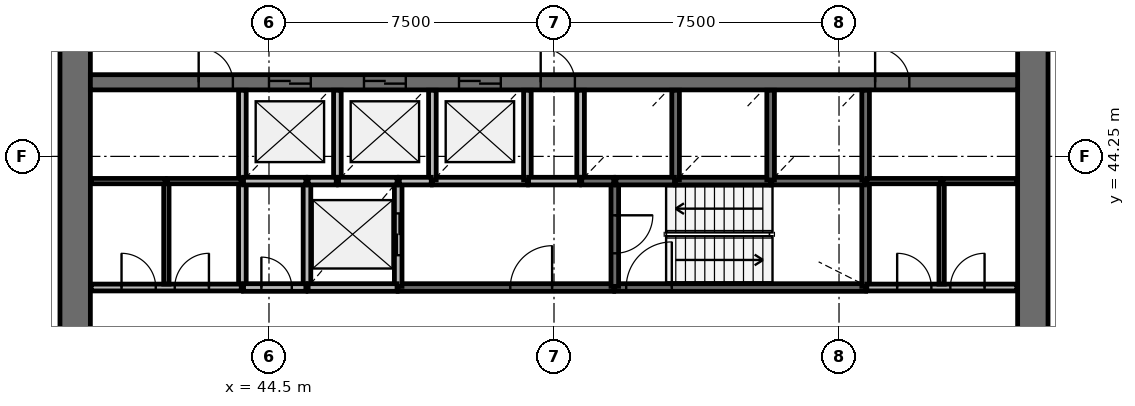
"""IFC4 building model, lengths in metres.
Left out: names, types, materials, properties, quantities, classifications, styles, units other than length and angle.
Written with IfcOpenShell. Run it as: python <this file> out.ifc"""

import sys

from ifc_helpers import new_model, si_unit, direction, frame, frame_2d, origin, place, context, subcontext, project, spatial, rectangle, extrude, source, transform, mapped, element, fill, save


model = new_model("IFC4")
c1 = context("Model", 3, precision=1e-05, world=origin(), true_north=direction((0.0, 1.0)))
c2 = subcontext(c1, "Body", "Model", "MODEL_VIEW")
j1 = project(units=[si_unit("LENGTHUNIT", "METRE"), si_unit("PLANEANGLEUNIT", "RADIAN")], contexts=[c1])
p1 = place(None, origin())
s1 = spatial("IfcSite", under=j1, at=p1, CompositionType="ELEMENT")
p2 = place(p1, origin())
s2 = spatial("IfcBuilding", under=s1, at=p2, CompositionType="ELEMENT")
p3 = place(p2, frame((0.0, 0.0, 112.6)))
s3 = spatial("IfcBuildingStorey", under=s2, at=p3, CompositionType="ELEMENT", Elevation=112.6)
p4 = place(p3, frame((64.6, 38.0, 0.0), z_axis=(0.0, 0.0, 1.0), x_axis=(0.0, 1.0, 0.0)))
e1 = element("IfcWall", 1, at=p4, inside=s3, PredefinedType="SHEAR", context=c2, shape_type="SweptSolid", body=[
    extrude(rectangle(XDim=20.0, YDim=0.8, at=frame_2d((10.0, 0.0))), origin(), (0.0, 0.0, 1.0), 4.1),
])
p5 = place(p4, frame((9.1, 0.0, 0.0)))
e2 = element("IfcOpeningElement", 2, at=p5, cuts=e1, PredefinedType="OPENING", context=c2, shape_type="SweptSolid", body=[
    extrude(rectangle(XDim=1.8, YDim=2.1, at=frame_2d((0.9, 1.05))), frame((0.0, 0.41, 0.0), z_axis=(0.0, -1.0, 0.0), x_axis=(1.0, 0.0, 0.0)), (0.0, 0.0, 1.0), 0.82),
])
p6 = place(p3, frame((39.4, 58.0, 0.0), z_axis=(0.0, 0.0, 1.0), x_axis=(0.0, -1.0, 0.0)))
e3 = element("IfcWall", 3, at=p6, inside=s3, PredefinedType="SHEAR", context=c2, shape_type="SweptSolid", body=[
    extrude(rectangle(XDim=20.0, YDim=0.8, at=frame_2d((10.0, 0.0))), origin(), (0.0, 0.0, 1.0), 4.1),
])
p7 = place(p6, frame((9.1, 0.0, 0.0)))
e4 = element("IfcOpeningElement", 4, at=p7, cuts=e3, PredefinedType="OPENING", context=c2, shape_type="SweptSolid", body=[
    extrude(rectangle(XDim=1.8, YDim=2.1, at=frame_2d((0.9, 1.05))), frame((0.0, 0.41, 0.0), z_axis=(0.0, -1.0, 0.0), x_axis=(1.0, 0.0, 0.0)), (0.0, 0.0, 1.0), 0.82),
])
p8 = place(p3, frame((39.8, 46.2, 0.0), z_axis=(0.0, 0.0, 1.0), x_axis=(1.0, 0.0, 0.0)))
e5 = element("IfcWall", 5, at=p8, inside=s3, PredefinedType="SHEAR", context=c2, shape_type="SweptSolid", body=[
    extrude(rectangle(XDim=24.4, YDim=0.4, at=frame_2d((12.2, 0.0))), origin(), (0.0, 0.0, 1.0), 4.1),
])
p9 = place(p8, frame((4.7, 0.0, 0.0)))
e6 = element("IfcOpeningElement", 6, at=p9, cuts=e5, PredefinedType="OPENING", context=c2, shape_type="SweptSolid", body=[
    extrude(rectangle(XDim=1.1, YDim=2.1, at=frame_2d((0.55, 1.05))), frame((0.0, 0.21, 0.0), z_axis=(0.0, -1.0, 0.0), x_axis=(1.0, 0.0, 0.0)), (0.0, 0.0, 1.0), 0.42),
])
p10 = place(p8, frame((7.2, 0.0, 0.0)))
e7 = element("IfcOpeningElement", 7, at=p10, cuts=e5, PredefinedType="OPENING", context=c2, shape_type="SweptSolid", body=[
    extrude(rectangle(XDim=1.1, YDim=2.1, at=frame_2d((0.55, 1.05))), frame((0.0, 0.21, 0.0), z_axis=(0.0, -1.0, 0.0), x_axis=(1.0, 0.0, 0.0)), (0.0, 0.0, 1.0), 0.42),
])
p11 = place(p8, frame((9.7, 0.0, 0.0)))
e8 = element("IfcOpeningElement", 8, at=p11, cuts=e5, PredefinedType="OPENING", context=c2, shape_type="SweptSolid", body=[
    extrude(rectangle(XDim=1.1, YDim=2.1, at=frame_2d((0.55, 1.05))), frame((0.0, 0.21, 0.0), z_axis=(0.0, -1.0, 0.0), x_axis=(1.0, 0.0, 0.0)), (0.0, 0.0, 1.0), 0.42),
])
p12 = place(p8, frame((20.65, 0.0, 0.0)))
e9 = element("IfcOpeningElement", 9, at=p12, cuts=e5, PredefinedType="OPENING", context=c2, shape_type="SweptSolid", body=[
    extrude(rectangle(XDim=0.9, YDim=2.1, at=frame_2d((0.45, 1.05))), frame((0.0, 0.21, 0.0), z_axis=(0.0, -1.0, 0.0), x_axis=(1.0, 0.0, 0.0)), (0.0, 0.0, 1.0), 0.42),
])
p13 = place(p8, frame((2.85, 0.0, 0.0)))
e10 = element("IfcOpeningElement", 10, at=p13, cuts=e5, PredefinedType="OPENING", context=c2, shape_type="SweptSolid", body=[
    extrude(rectangle(XDim=0.9, YDim=2.1, at=frame_2d((0.45, 1.05))), frame((0.0, 0.21, 0.0), z_axis=(0.0, -1.0, 0.0), x_axis=(1.0, 0.0, 0.0)), (0.0, 0.0, 1.0), 0.42),
])
p14 = place(p8, frame((11.85, 0.0, 0.0)))
e11 = element("IfcOpeningElement", 11, at=p14, cuts=e5, PredefinedType="OPENING", context=c2, shape_type="SweptSolid", body=[
    extrude(rectangle(XDim=0.9, YDim=2.1, at=frame_2d((0.45, 1.05))), frame((0.0, 0.21, 0.0), z_axis=(0.0, -1.0, 0.0), x_axis=(1.0, 0.0, 0.0)), (0.0, 0.0, 1.0), 0.42),
])
p15 = place(p3, frame((53.6, 40.8, 0.0), z_axis=(0.0, 0.0, 1.0), x_axis=(1.0, 0.0, 0.0)))
e12 = element("IfcWall", 12, at=p15, inside=s3, PredefinedType="SOLIDWALL", context=c2, shape_type="SweptSolid", body=[
    extrude(rectangle(XDim=6.6, YDim=0.2, at=frame_2d((3.3, 0.0))), origin(), (0.0, 0.0, 1.0), 3.7),
])
p16 = place(p15, frame((0.3, 0.0, 0.0)))
e13 = element("IfcOpeningElement", 13, at=p16, cuts=e12, PredefinedType="OPENING", context=c2, shape_type="SweptSolid", body=[
    extrude(rectangle(XDim=1.2, YDim=2.1, at=frame_2d((0.6, 1.05))), frame((0.0, 0.11, 0.0), z_axis=(0.0, -1.0, 0.0), x_axis=(1.0, 0.0, 0.0)), (0.0, 0.0, 1.0), 0.22),
])
p17 = place(p3, frame((47.9, 40.8, 0.0), z_axis=(0.0, 0.0, 1.0), x_axis=(1.0, 0.0, 0.0)))
e14 = element("IfcWall", 14, at=p17, inside=s3, PredefinedType="SOLIDWALL", context=c2, shape_type="SweptSolid", body=[
    extrude(rectangle(XDim=5.67, YDim=0.2, at=frame_2d((2.835, 0.0))), origin(), (0.0, 0.0, 1.0), 3.7),
])
p18 = place(p17, frame((2.95, 0.0, 0.0)))
e15 = element("IfcOpeningElement", 15, at=p18, cuts=e14, PredefinedType="OPENING", context=c2, shape_type="SweptSolid", body=[
    extrude(rectangle(XDim=1.1, YDim=2.1, at=frame_2d((0.55, 1.05))), frame((0.0, 0.11, 0.0), z_axis=(0.0, -1.0, 0.0), x_axis=(1.0, 0.0, 0.0)), (0.0, 0.0, 1.0), 0.22),
])
for number, where, z_axis, x_axis in (
    (16, (43.8, 43.6, 0.0), (0.0, 0.0, 1.0), (0.0, -1.0, 0.0)),
    (17, (45.5, 43.6, 0.0), (0.0, 0.0, 1.0), (0.0, -1.0, 0.0)),
):
    element("IfcWall", number, at=place(p3, frame(where, z_axis=z_axis, x_axis=x_axis)), inside=s3, PredefinedType="SOLIDWALL", context=c2, shape_type="SweptSolid", body=[
        extrude(rectangle(XDim=2.8, YDim=0.2, at=frame_2d((1.4, 0.0))), origin(), (0.0, 0.0, 1.0), 3.7),
    ])
p19 = place(p3, frame((47.9, 40.83, 0.0), z_axis=(0.0, 0.0, 1.0), x_axis=(0.0, 1.0, 0.0)))
e18 = element("IfcWall", 18, at=p19, inside=s3, PredefinedType="SOLIDWALL", context=c2, shape_type="SweptSolid", body=[
    extrude(rectangle(XDim=2.77, YDim=0.2, at=frame_2d((1.385, 0.0))), origin(), (0.0, 0.0, 1.0), 3.7),
])
p20 = place(p19, frame((0.82, 0.0, 0.0)))
e19 = element("IfcOpeningElement", 19, at=p20, cuts=e18, PredefinedType="OPENING", context=c2, shape_type="SweptSolid", body=[
    extrude(rectangle(XDim=1.1, YDim=2.1, at=frame_2d((0.55, 1.05))), frame((0.0, 0.11, 0.0), z_axis=(0.0, -1.0, 0.0), x_axis=(1.0, 0.0, 0.0)), (0.0, 0.0, 1.0), 0.22),
])
p21 = place(p3, frame((60.2, 40.83, 0.0), z_axis=(0.0, 0.0, 1.0), x_axis=(0.0, 1.0, 0.0)))
e20 = element("IfcWall", 20, at=p21, inside=s3, PredefinedType="SOLIDWALL", context=c2, shape_type="SweptSolid", body=[
    extrude(rectangle(XDim=2.77, YDim=0.2, at=frame_2d((1.385, 0.0))), origin(), (0.0, 0.0, 1.0), 3.7),
])
p22 = place(p3, frame((53.6, 43.6, 0.0), z_axis=(0.0, 0.0, 1.0), x_axis=(0.0, -1.0, 0.0)))
e21 = element("IfcWall", 21, at=p22, inside=s3, PredefinedType="SOLIDWALL", context=c2, shape_type="SweptSolid", body=[
    extrude(rectangle(XDim=2.77, YDim=0.2, at=frame_2d((1.385, 0.0))), origin(), (0.0, 0.0, 1.0), 3.7),
])
p23 = place(p22, frame((0.9, 0.0, 0.0)))
e22 = element("IfcOpeningElement", 22, at=p23, cuts=e21, PredefinedType="OPENING", context=c2, shape_type="SweptSolid", body=[
    extrude(rectangle(XDim=1.0, YDim=2.1, at=frame_2d((0.5, 1.05))), frame((0.0, 0.11, 0.0), z_axis=(0.0, -1.0, 0.0), x_axis=(1.0, 0.0, 0.0)), (0.0, 0.0, 1.0), 0.22),
])
for number, where, z_axis, x_axis in (
    (23, (48.8, 43.6, 0.0), (0.0, 0.0, 1.0), (1.0, 0.0, 0.0)),
    (24, (55.2, 43.6, 0.0), (0.0, 0.0, 1.0), (1.0, 0.0, 0.0)),
):
    element("IfcWall", number, at=place(p3, frame(where, z_axis=z_axis, x_axis=x_axis)), inside=s3, PredefinedType="SOLIDWALL", context=c2, shape_type="SweptSolid", body=[
        extrude(rectangle(XDim=2.5, YDim=0.2, at=frame_2d((1.25, 0.0))), origin(), (0.0, 0.0, 1.0), 3.7),
    ])
p24 = place(p3, frame((57.73, 43.6, 0.0), z_axis=(0.0, 0.0, 1.0), x_axis=(1.0, 0.0, 0.0)))
e25 = element("IfcWall", 25, at=p24, inside=s3, PredefinedType="SOLIDWALL", context=c2, shape_type="SweptSolid", body=[
    extrude(rectangle(XDim=2.44, YDim=0.2, at=frame_2d((1.22, 0.0))), origin(), (0.0, 0.0, 1.0), 3.7),
])
p25 = place(p3, frame((45.53, 40.8, 0.0), z_axis=(0.0, 0.0, 1.0), x_axis=(1.0, 0.0, 0.0)))
e26 = element("IfcWall", 26, at=p25, inside=s3, PredefinedType="SOLIDWALL", context=c2, shape_type="SweptSolid", body=[
    extrude(rectangle(XDim=2.34, YDim=0.2, at=frame_2d((1.17, 0.0))), origin(), (0.0, 0.0, 1.0), 3.7),
])
p26 = place(p3, frame((43.8, 45.99, 0.0), z_axis=(0.0, 0.0, 1.0), x_axis=(0.0, -1.0, 0.0)))
e27 = element("IfcWall", 27, at=p26, inside=s3, PredefinedType="SOLIDWALL", context=c2, shape_type="SweptSolid", body=[
    extrude(rectangle(XDim=2.36, YDim=0.2, at=frame_2d((1.18, 0.0))), origin(), (0.0, 0.0, 1.0), 3.7),
])
p27 = place(p3, frame((46.3, 43.6, 0.0), z_axis=(0.0, 0.0, 1.0), x_axis=(0.0, 1.0, 0.0)))
e28 = element("IfcWall", 28, at=p27, inside=s3, PredefinedType="SOLIDWALL", context=c2, shape_type="SweptSolid", body=[
    extrude(rectangle(XDim=2.39, YDim=0.2, at=frame_2d((1.195, 0.0))), origin(), (0.0, 0.0, 1.0), 3.7),
])
for number, where, z_axis, x_axis in (
    (29, (48.8, 43.63, 0.0), (0.0, 0.0, 1.0), (0.0, 1.0, 0.0)),
    (30, (51.3, 43.63, 0.0), (0.0, 0.0, 1.0), (0.0, 1.0, 0.0)),
):
    element("IfcWall", number, at=place(p3, frame(where, z_axis=z_axis, x_axis=x_axis)), inside=s3, PredefinedType="SOLIDWALL", context=c2, shape_type="SweptSolid", body=[
        extrude(rectangle(XDim=2.36, YDim=0.2, at=frame_2d((1.18, 0.0))), origin(), (0.0, 0.0, 1.0), 3.7),
    ])
p28 = place(p3, frame((52.7, 45.99, 0.0), z_axis=(0.0, 0.0, 1.0), x_axis=(0.0, -1.0, 0.0)))
e31 = element("IfcWall", 31, at=p28, inside=s3, PredefinedType="SOLIDWALL", context=c2, shape_type="SweptSolid", body=[
    extrude(rectangle(XDim=2.39, YDim=0.2, at=frame_2d((1.195, 0.0))), origin(), (0.0, 0.0, 1.0), 3.7),
])
for number, where, z_axis, x_axis in (
    (32, (55.2, 43.63, 0.0), (0.0, 0.0, 1.0), (0.0, 1.0, 0.0)),
    (33, (57.7, 43.63, 0.0), (0.0, 0.0, 1.0), (0.0, 1.0, 0.0)),
    (34, (60.2, 43.63, 0.0), (0.0, 0.0, 1.0), (0.0, 1.0, 0.0)),
):
    element("IfcWall", number, at=place(p3, frame(where, z_axis=z_axis, x_axis=x_axis)), inside=s3, PredefinedType="SOLIDWALL", context=c2, shape_type="SweptSolid", body=[
        extrude(rectangle(XDim=2.36, YDim=0.2, at=frame_2d((1.18, 0.0))), origin(), (0.0, 0.0, 1.0), 3.7),
    ])
p29 = place(p3, frame((43.83, 43.6, 0.0), z_axis=(0.0, 0.0, 1.0), x_axis=(1.0, 0.0, 0.0)))
e35 = element("IfcWall", 35, at=p29, inside=s3, PredefinedType="SOLIDWALL", context=c2, shape_type="SweptSolid", body=[
    extrude(rectangle(XDim=1.64, YDim=0.2, at=frame_2d((0.82, 0.0))), origin(), (0.0, 0.0, 1.0), 3.7),
])
p30 = place(p3, frame((43.83, 40.8, 0.0), z_axis=(0.0, 0.0, 1.0), x_axis=(1.0, 0.0, 0.0)))
e36 = element("IfcWall", 36, at=p30, inside=s3, PredefinedType="SOLIDWALL", context=c2, shape_type="SweptSolid", body=[
    extrude(rectangle(XDim=1.64, YDim=0.2, at=frame_2d((0.82, 0.0))), origin(), (0.0, 0.0, 1.0), 3.7),
])
p31 = place(p30, frame((0.47, 0.0, 0.0)))
e37 = element("IfcOpeningElement", 37, at=p31, cuts=e36, PredefinedType="OPENING", context=c2, shape_type="SweptSolid", body=[
    extrude(rectangle(XDim=0.8, YDim=2.1, at=frame_2d((0.4, 1.05))), frame((0.0, 0.11, 0.0), z_axis=(0.0, -1.0, 0.0), x_axis=(1.0, 0.0, 0.0)), (0.0, 0.0, 1.0), 0.22),
])
for number, where, z_axis, x_axis in (
    (38, (46.33, 43.6, 0.0), (0.0, 0.0, 1.0), (1.0, 0.0, 0.0)),
    (39, (53.63, 43.6, 0.0), (0.0, 0.0, 1.0), (1.0, 0.0, 0.0)),
):
    element("IfcWall", number, at=place(p3, frame(where, z_axis=z_axis, x_axis=x_axis)), inside=s3, PredefinedType="SOLIDWALL", context=c2, shape_type="SweptSolid", body=[
        extrude(rectangle(XDim=1.54, YDim=0.2, at=frame_2d((0.77, 0.0))), origin(), (0.0, 0.0, 1.0), 3.7),
    ])
p32 = place(p3, frame((52.67, 43.6, 0.0), z_axis=(0.0, 0.0, 1.0), x_axis=(-1.0, 0.0, 0.0)))
e40 = element("IfcWall", 40, at=p32, inside=s3, PredefinedType="SOLIDWALL", context=c2, shape_type="SweptSolid", body=[
    extrude(rectangle(XDim=1.34, YDim=0.2, at=frame_2d((0.67, 0.0))), origin(), (0.0, 0.0, 1.0), 3.7),
])
for number, where, z_axis, x_axis in (
    (41, (47.93, 43.6, 0.0), (0.0, 0.0, 1.0), (1.0, 0.0, 0.0)),
    (42, (52.73, 43.6, 0.0), (0.0, 0.0, 1.0), (1.0, 0.0, 0.0)),
):
    element("IfcWall", number, at=place(p3, frame(where, z_axis=z_axis, x_axis=x_axis)), inside=s3, PredefinedType="SOLIDWALL", context=c2, shape_type="SweptSolid", body=[
        extrude(rectangle(XDim=0.84, YDim=0.2, at=frame_2d((0.42, 0.0))), origin(), (0.0, 0.0, 1.0), 3.7),
    ])
p33 = place(p3, frame((45.53, 43.6, 0.0), z_axis=(0.0, 0.0, 1.0), x_axis=(1.0, 0.0, 0.0)))
e43 = element("IfcWall", 43, at=p33, inside=s3, PredefinedType="SOLIDWALL", context=c2, shape_type="SweptSolid", body=[
    extrude(rectangle(XDim=0.74, YDim=0.2, at=frame_2d((0.37, 0.0))), origin(), (0.0, 0.0, 1.0), 3.7),
])
p34 = place(p3, frame((60.23, 40.8, 0.0), z_axis=(0.0, 0.0, 1.0), x_axis=(1.0, 0.0, 0.0)))
e44 = element("IfcWall", 44, at=p34, inside=s3, PredefinedType="PARTITIONING", context=c2, shape_type="SweptSolid", body=[
    extrude(rectangle(XDim=3.95, YDim=0.18, at=frame_2d((1.975, 0.0))), origin(), (0.0, 0.0, 1.0), 3.7),
])
p35 = place(p34, frame((0.8, 0.0, 0.0)))
e45 = element("IfcOpeningElement", 45, at=p35, cuts=e44, PredefinedType="OPENING", context=c2, shape_type="SweptSolid", body=[
    extrude(rectangle(XDim=0.9, YDim=2.1, at=frame_2d((0.45, 1.05))), frame((0.0, 0.1, 0.0), z_axis=(0.0, -1.0, 0.0), x_axis=(1.0, 0.0, 0.0)), (0.0, 0.0, 1.0), 0.2),
])
p36 = place(p34, frame((2.2, 0.0, 0.0)))
e46 = element("IfcOpeningElement", 46, at=p36, cuts=e44, PredefinedType="OPENING", context=c2, shape_type="SweptSolid", body=[
    extrude(rectangle(XDim=0.9, YDim=2.1, at=frame_2d((0.45, 1.05))), frame((0.0, 0.1, 0.0), z_axis=(0.0, -1.0, 0.0), x_axis=(1.0, 0.0, 0.0)), (0.0, 0.0, 1.0), 0.2),
])
p37 = place(p3, frame((39.82, 40.8, 0.0), z_axis=(0.0, 0.0, 1.0), x_axis=(1.0, 0.0, 0.0)))
e47 = element("IfcWall", 47, at=p37, inside=s3, PredefinedType="PARTITIONING", context=c2, shape_type="SweptSolid", body=[
    extrude(rectangle(XDim=3.95, YDim=0.18, at=frame_2d((1.975, 0.0))), origin(), (0.0, 0.0, 1.0), 3.7),
])
p38 = place(p37, frame((0.8, 0.0, 0.0)))
e48 = element("IfcOpeningElement", 48, at=p38, cuts=e47, PredefinedType="OPENING", context=c2, shape_type="SweptSolid", body=[
    extrude(rectangle(XDim=0.9, YDim=2.1, at=frame_2d((0.45, 1.05))), frame((0.0, 0.1, 0.0), z_axis=(0.0, -1.0, 0.0), x_axis=(1.0, 0.0, 0.0)), (0.0, 0.0, 1.0), 0.2),
])
p39 = place(p37, frame((2.2, 0.0, 0.0)))
e49 = element("IfcOpeningElement", 49, at=p39, cuts=e47, PredefinedType="OPENING", context=c2, shape_type="SweptSolid", body=[
    extrude(rectangle(XDim=0.9, YDim=2.1, at=frame_2d((0.45, 1.05))), frame((0.0, 0.1, 0.0), z_axis=(0.0, -1.0, 0.0), x_axis=(1.0, 0.0, 0.0)), (0.0, 0.0, 1.0), 0.2),
])
for number, where, z_axis, x_axis in (
    (50, (41.8, 40.89, 0.0), (0.0, 0.0, 1.0), (0.0, 1.0, 0.0)),
    (51, (62.2, 40.89, 0.0), (0.0, 0.0, 1.0), (0.0, 1.0, 0.0)),
):
    element("IfcWall", number, at=place(p3, frame(where, z_axis=z_axis, x_axis=x_axis)), inside=s3, PredefinedType="PARTITIONING", context=c2, shape_type="SweptSolid", body=[
        extrude(rectangle(XDim=2.71, YDim=0.14, at=frame_2d((1.355, 0.0))), origin(), (0.0, 0.0, 1.0), 2.9),
    ])
for number, where, z_axis, x_axis in (
    (52, (43.77, 43.6, 0.0), (0.0, 0.0, 1.0), (-1.0, 0.0, 0.0)),
    (53, (60.23, 43.6, 0.0), (0.0, 0.0, 1.0), (1.0, 0.0, 0.0)),
):
    element("IfcWall", number, at=place(p3, frame(where, z_axis=z_axis, x_axis=x_axis)), inside=s3, PredefinedType="PARTITIONING", context=c2, shape_type="SweptSolid", body=[
        extrude(rectangle(XDim=1.94, YDim=0.14, at=frame_2d((0.97, 0.0))), origin(), (0.0, 0.0, 1.0), 2.9),
    ])
for number, where, z_axis, x_axis in (
    (54, (62.23, 43.6, 0.0), (0.0, 0.0, 1.0), (1.0, 0.0, 0.0)),
    (55, (41.77, 43.6, 0.0), (0.0, 0.0, 1.0), (-1.0, 0.0, 0.0)),
):
    element("IfcWall", number, at=place(p3, frame(where, z_axis=z_axis, x_axis=x_axis)), inside=s3, PredefinedType="PARTITIONING", context=c2, shape_type="SweptSolid", body=[
        extrude(rectangle(XDim=1.95, YDim=0.14, at=frame_2d((0.975, 0.0))), origin(), (0.0, 0.0, 1.0), 2.9),
    ])
m1 = source(origin(), c2, "Body", "SweptSolid", [
    extrude(rectangle(XDim=1.1, YDim=2.1, at=frame_2d((0.55, 1.05))), frame((0.0, 0.025, 0.0), z_axis=(0.0, -1.0, 0.0), x_axis=(1.0, 0.0, 0.0)), (0.0, 0.0, 1.0), 0.05),
])
p40 = place(p9, origin())
e56 = element("IfcDoor", 56, at=p40, inside=s3, OperationType="DOUBLE_DOOR_SLIDING", PredefinedType="USERDEFINED", context=c2, shape_type="MappedRepresentation", body=[
    mapped(m1, transform((0.0, 0.0, 0.0), scale=1.0)),
])
fill(e6, e56)
p41 = place(p10, origin())
e57 = element("IfcDoor", 57, at=p41, inside=s3, OperationType="DOUBLE_DOOR_SLIDING", PredefinedType="USERDEFINED", context=c2, shape_type="MappedRepresentation", body=[
    mapped(m1, transform((0.0, 0.0, 0.0), scale=1.0)),
])
fill(e7, e57)
p42 = place(p11, origin())
e58 = element("IfcDoor", 58, at=p42, inside=s3, OperationType="DOUBLE_DOOR_SLIDING", PredefinedType="USERDEFINED", context=c2, shape_type="MappedRepresentation", body=[
    mapped(m1, transform((0.0, 0.0, 0.0), scale=1.0)),
])
fill(e8, e58)
p43 = place(p20, origin())
e59 = element("IfcDoor", 59, at=p43, inside=s3, OperationType="DOUBLE_DOOR_SLIDING", PredefinedType="USERDEFINED", context=c2, shape_type="MappedRepresentation", body=[
    mapped(m1, transform((0.0, 0.0, 0.0), scale=1.0)),
])
fill(e19, e59)
m2 = source(origin(), c2, "Body", "SweptSolid", [
    extrude(rectangle(XDim=1.2, YDim=2.1, at=frame_2d((0.6, 1.05))), frame((0.0, 0.025, 0.0), z_axis=(0.0, -1.0, 0.0), x_axis=(1.0, 0.0, 0.0)), (0.0, 0.0, 1.0), 0.05),
])
p44 = place(p16, origin())
e60 = element("IfcDoor", 60, at=p44, inside=s3, OperationType="SINGLE_SWING_RIGHT", PredefinedType="DOOR", context=c2, shape_type="MappedRepresentation", body=[
    mapped(m2, transform((0.0, 0.0, 0.0), scale=1.0)),
])
fill(e13, e60)
m3 = source(origin(), c2, "Body", "SweptSolid", [
    extrude(rectangle(XDim=1.0, YDim=2.1, at=frame_2d((0.5, 1.05))), frame((0.0, 0.025, 0.0), z_axis=(0.0, -1.0, 0.0), x_axis=(1.0, 0.0, 0.0)), (0.0, 0.0, 1.0), 0.05),
])
p45 = place(p23, origin())
e61 = element("IfcDoor", 61, at=p45, inside=s3, OperationType="SINGLE_SWING_LEFT", PredefinedType="DOOR", context=c2, shape_type="MappedRepresentation", body=[
    mapped(m3, transform((0.0, 0.0, 0.0), scale=1.0)),
])
fill(e22, e61)
m4 = source(origin(), c2, "Body", "SweptSolid", [
    extrude(rectangle(XDim=1.1, YDim=2.1, at=frame_2d((0.55, 1.05))), frame((0.0, 0.025, 0.0), z_axis=(0.0, -1.0, 0.0), x_axis=(1.0, 0.0, 0.0)), (0.0, 0.0, 1.0), 0.05),
])
p46 = place(p18, origin())
e62 = element("IfcDoor", 62, at=p46, inside=s3, OperationType="SINGLE_SWING_RIGHT", PredefinedType="DOOR", context=c2, shape_type="MappedRepresentation", body=[
    mapped(m4, transform((0.0, 0.0, 0.0), scale=1.0)),
])
fill(e15, e62)
m5 = source(origin(), c2, "Body", "SweptSolid", [
    extrude(rectangle(XDim=0.8, YDim=2.1, at=frame_2d((0.4, 1.05))), frame((0.0, 0.025, 0.0), z_axis=(0.0, -1.0, 0.0), x_axis=(1.0, 0.0, 0.0)), (0.0, 0.0, 1.0), 0.05),
])
p47 = place(p31, origin())
e63 = element("IfcDoor", 63, at=p47, inside=s3, OperationType="SINGLE_SWING_LEFT", PredefinedType="DOOR", context=c2, shape_type="MappedRepresentation", body=[
    mapped(m5, transform((0.0, 0.0, 0.0), scale=1.0)),
])
fill(e37, e63)
m6 = source(origin(), c2, "Body", "SweptSolid", [
    extrude(rectangle(XDim=0.9, YDim=2.1, at=frame_2d((0.45, 1.05))), frame((0.0, 0.025, 0.0), z_axis=(0.0, -1.0, 0.0), x_axis=(1.0, 0.0, 0.0)), (0.0, 0.0, 1.0), 0.05),
])
p48 = place(p38, origin())
e64 = element("IfcDoor", 64, at=p48, inside=s3, OperationType="SINGLE_SWING_LEFT", PredefinedType="DOOR", context=c2, shape_type="MappedRepresentation", body=[
    mapped(m6, transform((0.0, 0.0, 0.0), scale=1.0)),
])
fill(e48, e64)
p49 = place(p39, origin())
e65 = element("IfcDoor", 65, at=p49, inside=s3, OperationType="SINGLE_SWING_RIGHT", PredefinedType="DOOR", context=c2, shape_type="MappedRepresentation", body=[
    mapped(m6, transform((0.0, 0.0, 0.0), scale=1.0)),
])
fill(e49, e65)
p50 = place(p12, origin())
e66 = element("IfcDoor", 66, at=p50, inside=s3, OperationType="SINGLE_SWING_LEFT", PredefinedType="DOOR", context=c2, shape_type="MappedRepresentation", body=[
    mapped(m6, transform((0.0, 0.0, 0.0), scale=1.0)),
])
fill(e9, e66)
p51 = place(p35, origin())
e67 = element("IfcDoor", 67, at=p51, inside=s3, OperationType="SINGLE_SWING_LEFT", PredefinedType="DOOR", context=c2, shape_type="MappedRepresentation", body=[
    mapped(m6, transform((0.0, 0.0, 0.0), scale=1.0)),
])
fill(e45, e67)
p52 = place(p36, origin())
e68 = element("IfcDoor", 68, at=p52, inside=s3, OperationType="SINGLE_SWING_RIGHT", PredefinedType="DOOR", context=c2, shape_type="MappedRepresentation", body=[
    mapped(m6, transform((0.0, 0.0, 0.0), scale=1.0)),
])
fill(e46, e68)
p53 = place(p13, origin())
e69 = element("IfcDoor", 69, at=p53, inside=s3, OperationType="SINGLE_SWING_LEFT", PredefinedType="DOOR", context=c2, shape_type="MappedRepresentation", body=[
    mapped(m6, transform((0.0, 0.0, 0.0), scale=1.0)),
])
fill(e10, e69)
p54 = place(p14, origin())
e70 = element("IfcDoor", 70, at=p54, inside=s3, OperationType="SINGLE_SWING_LEFT", PredefinedType="DOOR", context=c2, shape_type="MappedRepresentation", body=[
    mapped(m6, transform((0.0, 0.0, 0.0), scale=1.0)),
])
fill(e11, e70)
save(model, sys.argv[1])
